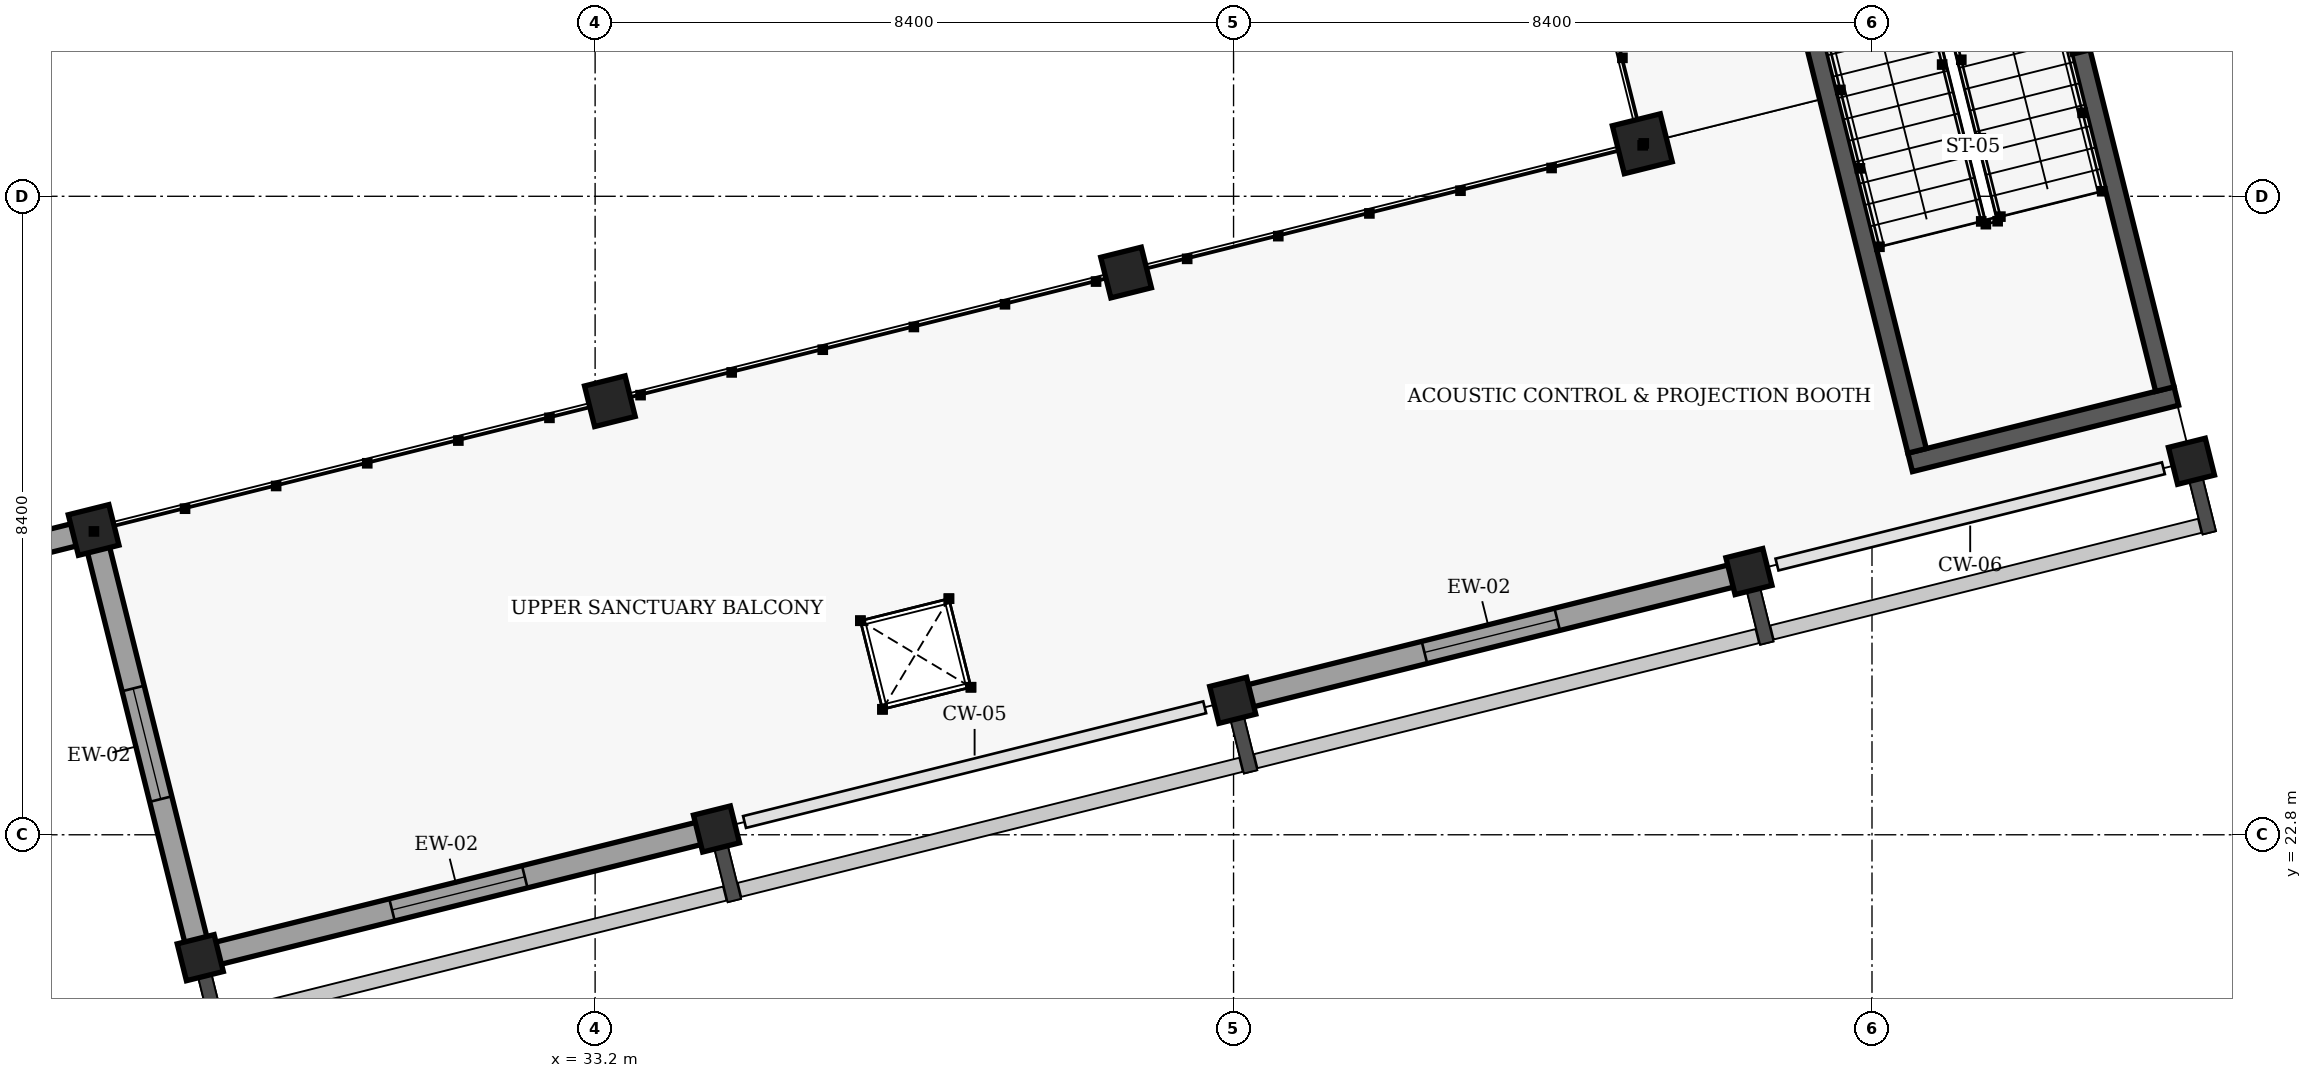
"""IFC4 building model, lengths in metres.
Left out: names, types, materials, properties, quantities, classifications, styles, units other than length and angle.
Written with IfcOpenShell. Run it as: python <this file> out.ifc"""

import sys

from ifc_helpers import new_model, si_unit, direction, frame, frame_2d, origin, origin_2d, place, context, subcontext, project, spatial, rectangle, extrude, element, fill, save


model = new_model("IFC4")
c1 = context("Model", 3, precision=1e-05, world=origin(), true_north=direction((0.0, 1.0)))
c2 = subcontext(c1, "Body", "Model", "MODEL_VIEW")
j1 = project(units=[si_unit("LENGTHUNIT", "METRE"), si_unit("PLANEANGLEUNIT", "RADIAN")], contexts=[c1])
p1 = place(None, origin())
s1 = spatial("IfcSite", under=j1, at=p1, CompositionType="ELEMENT")
p2 = place(p1, origin())
s2 = spatial("IfcBuilding", under=s1, at=p2, CompositionType="ELEMENT")
p3 = place(p2, frame((0.0, 0.0, 4.8)))
s3 = spatial("IfcBuildingStorey", under=s2, at=p3, CompositionType="ELEMENT", Elevation=4.8)
p4 = place(p3, frame((46.978, 31.891, 0.0), z_axis=(0.0, 0.0, 1.0), x_axis=(0.970295726276, 0.2419218956, 0.0)))
e1 = element("IfcColumn", 1, at=p4, inside=s3, PredefinedType="COLUMN", context=c2, shape_type="SweptSolid", body=[
    extrude(rectangle(XDim=0.65, YDim=0.65, at=origin_2d()), origin(), (0.0, 0.0, 1.0), 4.2),
])
p5 = place(p3, frame((52.799, 33.342, 0.0), z_axis=(0.0, 0.0, 1.0), x_axis=(0.970295726276, 0.2419218956, 0.0)))
e2 = element("IfcColumn", 2, at=p5, inside=s3, PredefinedType="COLUMN", context=c2, shape_type="SweptSolid", body=[
    extrude(rectangle(XDim=0.45, YDim=0.45, at=origin_2d()), origin(), (0.0, 0.0, 1.0), 4.2),
])
for number, where, z_axis, x_axis in (
    (3, (28.005, 21.183, 0.0), (0.0, 0.0, 1.0), (0.97, 0.242, 0.0)),
    (4, (34.797, 22.876, 0.0), (0.0, 0.0, 1.0), (0.97, 0.242, 0.0)),
    (5, (41.589, 24.569, 0.0), (0.0, 0.0, 1.0), (0.97, 0.242, 0.0)),
    (6, (48.381, 26.263, 0.0), (0.0, 0.0, 1.0), (0.97, 0.242, 0.0)),
    (7, (54.203, 27.714, 0.0), (0.0, 0.0, 1.0), (0.97, 0.242, 0.0)),
):
    element("IfcColumn", number, at=place(p3, frame(where, z_axis=z_axis, x_axis=x_axis)), inside=s3, PredefinedType="COLUMN", context=c2, shape_type="SweptSolid", body=[
        extrude(rectangle(XDim=0.5, YDim=0.5, at=origin_2d()), origin(), (0.0, 0.0, 1.0), 4.2),
    ])
for number, where, z_axis, x_axis in (
    (8, (26.602, 26.81, 0.0), (0.0, 0.0, 1.0), (0.97, 0.242, 0.0)),
    (9, (33.394, 28.504, 0.0), (0.0, 0.0, 1.0), (0.97, 0.242, 0.0)),
    (10, (40.186, 30.197, 0.0), (0.0, 0.0, 1.0), (0.97, 0.242, 0.0)),
):
    element("IfcColumn", number, at=place(p3, frame(where, z_axis=z_axis, x_axis=x_axis)), inside=s3, PredefinedType="COLUMN", context=c2, shape_type="SweptSolid", body=[
        extrude(rectangle(XDim=0.55, YDim=0.55, at=origin_2d()), origin(), (0.0, 0.0, 1.0), 4.2),
    ])
p6 = place(p3, frame((28.102, 21.207, 0.0), z_axis=(0.0, 0.0, 1.0), x_axis=(0.970296478685, 0.241918877831, 0.0)))
e11 = element("IfcWall", 11, at=p6, inside=s3, PredefinedType="SOLIDWALL", context=c2, shape_type="SweptSolid", body=[
    extrude(rectangle(XDim=6.8, YDim=0.3, at=frame_2d((3.4, 0.0))), origin(), (0.0, 0.0, 1.0), 3.465),
])
p7 = place(p6, frame((2.5, 0.0, 0.9)))
e12 = element("IfcOpeningElement", 12, at=p7, cuts=e11, PredefinedType="OPENING", context=c2, shape_type="SweptSolid", body=[
    extrude(rectangle(XDim=1.8, YDim=1.8, at=frame_2d((0.9, 0.9))), frame((0.0, 0.16, 0.0), z_axis=(0.0, -1.0, 0.0), x_axis=(1.0, 0.0, 0.0)), (0.0, 0.0, 1.0), 0.32),
])
p8 = place(p3, frame((41.686, 24.594, 0.0), z_axis=(0.0, 0.0, 1.0), x_axis=(0.970296478685, 0.241918877831, 0.0)))
e13 = element("IfcWall", 13, at=p8, inside=s3, PredefinedType="SOLIDWALL", context=c2, shape_type="SweptSolid", body=[
    extrude(rectangle(XDim=6.8, YDim=0.3, at=frame_2d((3.4, 0.0))), origin(), (0.0, 0.0, 1.0), 3.465),
])
p9 = place(p8, frame((2.5, 0.0, 0.9)))
e14 = element("IfcOpeningElement", 14, at=p9, cuts=e13, PredefinedType="OPENING", context=c2, shape_type="SweptSolid", body=[
    extrude(rectangle(XDim=1.8, YDim=1.8, at=frame_2d((0.9, 0.9))), frame((0.0, 0.16, 0.0), z_axis=(0.0, -1.0, 0.0), x_axis=(1.0, 0.0, 0.0)), (0.0, 0.0, 1.0), 0.32),
])
p10 = place(p3, frame((27.986, 21.261, 0.0), z_axis=(0.0, 0.0, 1.0), x_axis=(-0.242077152267, 0.970257003247, 0.0)))
e15 = element("IfcWall", 15, at=p10, inside=s3, PredefinedType="SOLIDWALL", context=c2, shape_type="SweptSolid", body=[
    extrude(rectangle(XDim=5.639, YDim=0.3, at=frame_2d((2.819, 0.0))), origin(), (0.0, 0.0, 1.0), 3.495),
])
p11 = place(p10, frame((2.07, 0.0, 0.9)))
e16 = element("IfcOpeningElement", 16, at=p11, cuts=e15, PredefinedType="OPENING", context=c2, shape_type="SweptSolid", body=[
    extrude(rectangle(XDim=1.5, YDim=1.5, at=frame_2d((0.75, 0.75))), frame((0.0, 0.16, 0.0), z_axis=(0.0, -1.0, 0.0), x_axis=(1.0, 0.0, 0.0)), (0.0, 0.0, 1.0), 0.32),
])
p12 = place(p3, frame((19.887, 25.136, 0.0), z_axis=(0.0, 0.0, 1.0), x_axis=(0.970287194641, 0.241956111549, 0.0)))
e17 = element("IfcWall", 17, at=p12, inside=s3, PredefinedType="SOLIDWALL", context=c2, shape_type="SweptSolid", body=[
    extrude(rectangle(XDim=6.84, YDim=0.3, at=frame_2d((3.42, 0.0))), origin(), (0.0, 0.0, 1.0), 3.485),
])
p13 = place(p12, frame((2.67, 0.0, 0.9)))
e18 = element("IfcOpeningElement", 18, at=p13, cuts=e17, PredefinedType="OPENING", context=c2, shape_type="SweptSolid", body=[
    extrude(rectangle(XDim=1.5, YDim=1.5, at=frame_2d((0.75, 0.75))), frame((0.0, 0.16, 0.0), z_axis=(0.0, -1.0, 0.0), x_axis=(1.0, 0.0, 0.0)), (0.0, 0.0, 1.0), 0.32),
])
p14 = place(p3, frame((54.004, 28.572, 0.0), z_axis=(0.0, 0.0, 1.0), x_axis=(-0.970301456204, -0.241898912952, 0.0)))
e19 = element("IfcWall", 19, at=p14, inside=s3, PredefinedType="SHEAR", context=c2, shape_type="SweptSolid", body=[
    extrude(rectangle(XDim=3.609, YDim=0.25, at=frame_2d((1.805, 0.0))), origin(), (0.0, 0.0, 1.0), 3.96),
])
p15 = place(p3, frame((52.065, 35.834, 0.0), z_axis=(0.0, 0.0, 1.0), x_axis=(0.241944845077, -0.97029000404, 0.0)))
e20 = element("IfcWall", 20, at=p15, inside=s3, PredefinedType="SHEAR", context=c2, shape_type="SweptSolid", body=[
    extrude(rectangle(XDim=7.39, YDim=0.25, at=frame_2d((3.695, 0.0))), origin(), (0.0, 0.0, 1.0), 3.96),
])
p16 = place(p3, frame((50.593, 27.851, 0.0), z_axis=(0.0, 0.0, 1.0), x_axis=(-0.241975869228, 0.970282267544, 0.0)))
e21 = element("IfcWall", 21, at=p16, inside=s3, PredefinedType="SHEAR", context=c2, shape_type="SweptSolid", body=[
    extrude(rectangle(XDim=7.389, YDim=0.25, at=frame_2d((3.695, 0.0))), origin(), (0.0, 0.0, 1.0), 3.96),
])
p17 = place(p7, origin())
e22 = element("IfcWindow", 22, at=p17, inside=s3, PartitioningType="SINGLE_PANEL", PredefinedType="WINDOW", context=c2, shape_type="SweptSolid", body=[
    extrude(rectangle(XDim=1.8, YDim=1.8, at=frame_2d((0.9, 0.9))), frame((0.0, 0.03, 0.0), z_axis=(0.0, -1.0, 0.0), x_axis=(1.0, 0.0, 0.0)), (0.0, 0.0, 1.0), 0.06),
])
fill(e12, e22)
p18 = place(p9, origin())
e23 = element("IfcWindow", 23, at=p18, inside=s3, PartitioningType="SINGLE_PANEL", PredefinedType="WINDOW", context=c2, shape_type="SweptSolid", body=[
    extrude(rectangle(XDim=1.8, YDim=1.8, at=frame_2d((0.9, 0.9))), frame((0.0, 0.03, 0.0), z_axis=(0.0, -1.0, 0.0), x_axis=(1.0, 0.0, 0.0)), (0.0, 0.0, 1.0), 0.06),
])
fill(e14, e23)
p19 = place(p11, origin())
e24 = element("IfcWindow", 24, at=p19, inside=s3, PartitioningType="SINGLE_PANEL", PredefinedType="WINDOW", context=c2, shape_type="SweptSolid", body=[
    extrude(rectangle(XDim=1.5, YDim=1.5, at=frame_2d((0.75, 0.75))), frame((0.0, 0.03, 0.0), z_axis=(0.0, -1.0, 0.0), x_axis=(1.0, 0.0, 0.0)), (0.0, 0.0, 1.0), 0.06),
])
fill(e16, e24)
save(model, sys.argv[1])
